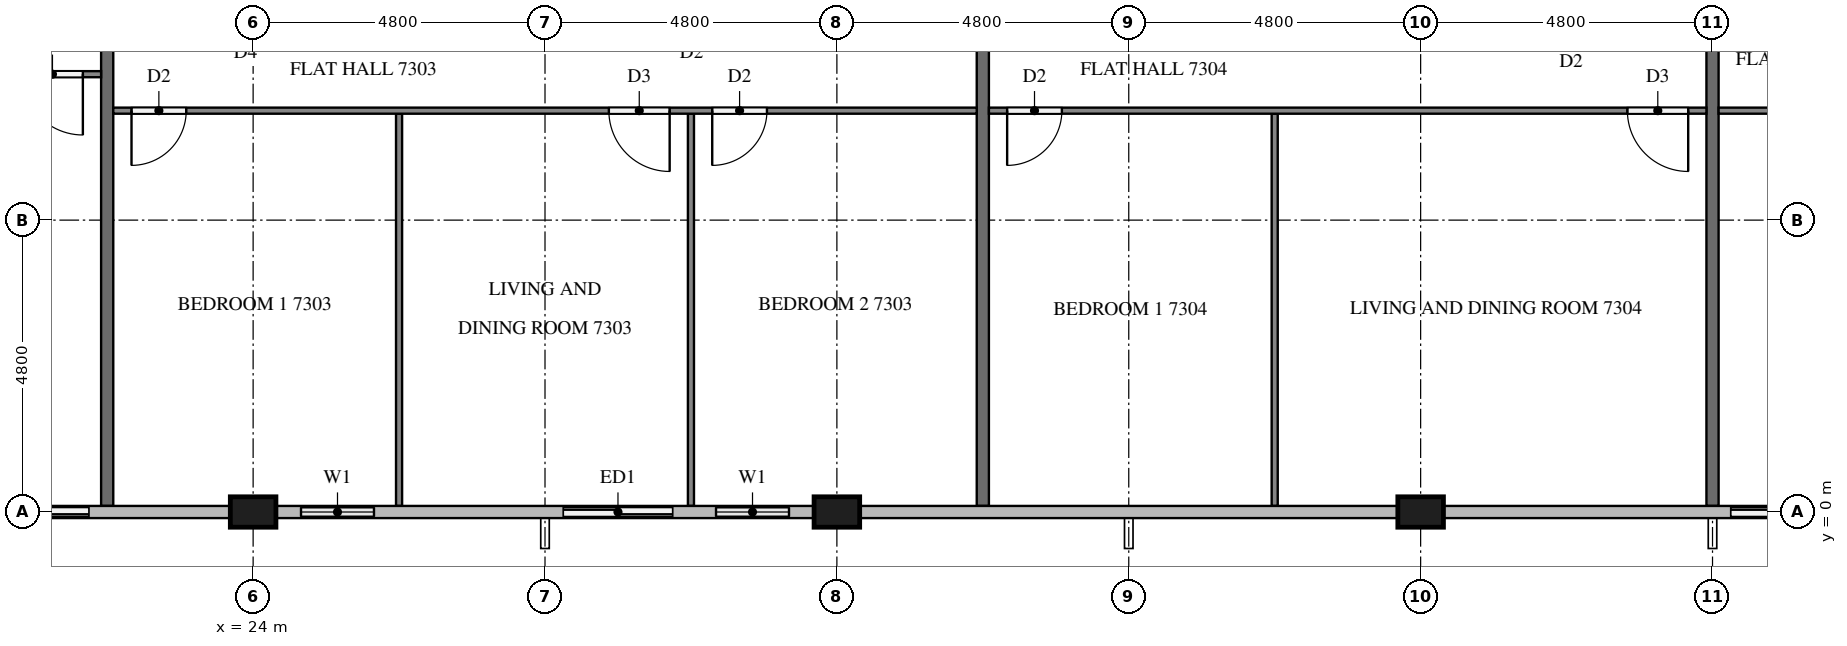
"""IFC4 building model, lengths in metres.
Left out: names, types, materials, properties, quantities, classifications, styles, units other than length and angle.
Written with IfcOpenShell. Run it as: python <this file> out.ifc"""

import sys

from ifc_helpers import new_model, si_unit, direction, frame, frame_2d, origin, origin_2d, place, context, subcontext, project, spatial, rectangle, extrude, element, fill, save


model = new_model("IFC4")
c1 = context("Model", 3, precision=1e-05, world=origin(), true_north=direction((0.0, 1.0)))
c2 = subcontext(c1, "Body", "Model", "MODEL_VIEW")
j1 = project(units=[si_unit("LENGTHUNIT", "METRE"), si_unit("PLANEANGLEUNIT", "RADIAN")], contexts=[c1])
p1 = place(None, origin())
s1 = spatial("IfcSite", under=j1, at=p1, CompositionType="ELEMENT")
p2 = place(p1, origin())
s2 = spatial("IfcBuilding", under=s1, at=p2, CompositionType="ELEMENT")
p3 = place(p2, frame((0.0, 0.0, 279.1)))
s3 = spatial("IfcBuildingStorey", under=s2, at=p3, CompositionType="ELEMENT", Elevation=279.1)
for number, where, z_axis, x_axis in (
    (1, (24.0, 0.0, 0.0), (0.0, 0.0, 1.0), (1.0, 0.0, 0.0)),
    (2, (33.6, 0.0, 0.0), (0.0, 0.0, 1.0), (1.0, 0.0, 0.0)),
    (3, (43.2, 0.0, 0.0), (0.0, 0.0, 1.0), (1.0, 0.0, 0.0)),
):
    element("IfcColumn", number, at=place(p3, frame(where, z_axis=z_axis, x_axis=x_axis)), inside=s3, PredefinedType="COLUMN", context=c2, shape_type="SweptSolid", body=[
        extrude(rectangle(XDim=0.75, YDim=0.5, at=origin_2d()), origin(), (0.0, 0.0, 1.0), 3.2),
    ])
p4 = place(p3, frame((19.2, 0.0, 0.0), z_axis=(0.0, 0.0, 1.0), x_axis=(1.0, 0.0, 0.0)))
e4 = element("IfcWall", 4, at=p4, inside=s3, PredefinedType="SOLIDWALL", context=c2, shape_type="SweptSolid", body=[
    extrude(rectangle(XDim=2.4, YDim=0.15, at=frame_2d((1.2, 0.0))), origin(), (0.0, 0.0, 1.0), 3.2),
])
p5 = place(p4, frame((0.3, 0.0, 0.0)))
e5 = element("IfcOpeningElement", 5, at=p5, cuts=e4, PredefinedType="OPENING", context=c2, shape_type="SweptSolid", body=[
    extrude(rectangle(XDim=1.8, YDim=2.4, at=frame_2d((0.9, 1.2))), frame((0.0, 0.085, 0.0), z_axis=(0.0, -1.0, 0.0), x_axis=(1.0, 0.0, 0.0)), (0.0, 0.0, 1.0), 0.17),
])
p6 = place(p3, frame((24.375, 0.0, 0.0), z_axis=(0.0, 0.0, 1.0), x_axis=(1.0, 0.0, 0.0)))
e6 = element("IfcWall", 6, at=p6, inside=s3, PredefinedType="SOLIDWALL", context=c2, shape_type="SweptSolid", body=[
    extrude(rectangle(XDim=2.025, YDim=0.15, at=frame_2d((1.012, 0.0))), origin(), (0.0, 0.0, 1.0), 3.2),
])
p7 = place(p6, frame((0.413, 0.0, 0.9)))
e7 = element("IfcOpeningElement", 7, at=p7, cuts=e6, PredefinedType="OPENING", context=c2, shape_type="SweptSolid", body=[
    extrude(rectangle(XDim=1.2, YDim=1.4, at=frame_2d((0.6, 0.7))), frame((0.0, 0.085, 0.0), z_axis=(0.0, -1.0, 0.0), x_axis=(1.0, 0.0, 0.0)), (0.0, 0.0, 1.0), 0.17),
])
p8 = place(p3, frame((28.8, 0.0, 0.0), z_axis=(0.0, 0.0, 1.0), x_axis=(1.0, 0.0, 0.0)))
e8 = element("IfcWall", 8, at=p8, inside=s3, PredefinedType="SOLIDWALL", context=c2, shape_type="SweptSolid", body=[
    extrude(rectangle(XDim=4.425, YDim=0.15, at=frame_2d((2.212, 0.0))), origin(), (0.0, 0.0, 1.0), 3.2),
])
p9 = place(p8, frame((0.3, 0.0, 0.0)))
e9 = element("IfcOpeningElement", 9, at=p9, cuts=e8, PredefinedType="OPENING", context=c2, shape_type="SweptSolid", body=[
    extrude(rectangle(XDim=1.8, YDim=2.4, at=frame_2d((0.9, 1.2))), frame((0.0, 0.085, 0.0), z_axis=(0.0, -1.0, 0.0), x_axis=(1.0, 0.0, 0.0)), (0.0, 0.0, 1.0), 0.17),
])
p10 = place(p8, frame((2.812, 0.0, 0.9)))
e10 = element("IfcOpeningElement", 10, at=p10, cuts=e8, PredefinedType="OPENING", context=c2, shape_type="SweptSolid", body=[
    extrude(rectangle(XDim=1.2, YDim=1.4, at=frame_2d((0.6, 0.7))), frame((0.0, 0.085, 0.0), z_axis=(0.0, -1.0, 0.0), x_axis=(1.0, 0.0, 0.0)), (0.0, 0.0, 1.0), 0.17),
])
p11 = place(p3, frame((48.0, 0.0, 0.0), z_axis=(0.0, 0.0, 1.0), x_axis=(1.0, 0.0, 0.0)))
e11 = element("IfcWall", 11, at=p11, inside=s3, PredefinedType="SOLIDWALL", context=c2, shape_type="SweptSolid", body=[
    extrude(rectangle(XDim=2.4, YDim=0.15, at=frame_2d((1.2, 0.0))), origin(), (0.0, 0.0, 1.0), 3.2),
])
p12 = place(p11, frame((0.3, 0.0, 0.0)))
e12 = element("IfcOpeningElement", 12, at=p12, cuts=e11, PredefinedType="OPENING", context=c2, shape_type="SweptSolid", body=[
    extrude(rectangle(XDim=1.8, YDim=2.4, at=frame_2d((0.9, 1.2))), frame((0.0, 0.085, 0.0), z_axis=(0.0, -1.0, 0.0), x_axis=(1.0, 0.0, 0.0)), (0.0, 0.0, 1.0), 0.17),
])
for number, where, z_axis, x_axis in (
    (13, (21.6, 11.9, 0.0), (0.0, 0.0, 1.0), (0.0, -1.0, 0.0)),
    (14, (36.0, 11.9, 0.0), (0.0, 0.0, 1.0), (0.0, -1.0, 0.0)),
    (15, (48.0, 11.9, 0.0), (0.0, 0.0, 1.0), (0.0, -1.0, 0.0)),
):
    element("IfcWall", number, at=place(p3, frame(where, z_axis=z_axis, x_axis=x_axis)), inside=s3, PredefinedType="PARTITIONING", context=c2, shape_type="SweptSolid", body=[
        extrude(rectangle(XDim=11.8, YDim=0.2, at=frame_2d((5.9, 0.0))), origin(), (0.0, 0.0, 1.0), 3.2),
    ])
p13 = place(p3, frame((21.5, 7.2, 0.0), z_axis=(0.0, 0.0, 1.0), x_axis=(-1.0, 0.0, 0.0)))
e16 = element("IfcWall", 16, at=p13, inside=s3, PredefinedType="PARTITIONING", context=c2, shape_type="SweptSolid", body=[
    extrude(rectangle(XDim=7.0, YDim=0.1, at=frame_2d((3.5, 0.0))), origin(), (0.0, 0.0, 1.0), 3.2),
])
p14 = place(p13, frame((0.3, 0.0, 0.0)))
e17 = element("IfcOpeningElement", 17, at=p14, cuts=e16, PredefinedType="OPENING", context=c2, shape_type="SweptSolid", body=[
    extrude(rectangle(XDim=1.0, YDim=2.1, at=frame_2d((0.5, 1.05))), frame((0.0, 0.06, 0.0), z_axis=(0.0, -1.0, 0.0), x_axis=(1.0, 0.0, 0.0)), (0.0, 0.0, 1.0), 0.12),
])
for number, where, z_axis, x_axis in (
    (18, (26.4, 6.55, 0.0), (0.0, 0.0, 1.0), (0.0, -1.0, 0.0)),
    (19, (31.2, 6.55, 0.0), (0.0, 0.0, 1.0), (0.0, -1.0, 0.0)),
):
    element("IfcWall", number, at=place(p3, frame(where, z_axis=z_axis, x_axis=x_axis)), inside=s3, PredefinedType="PARTITIONING", context=c2, shape_type="SweptSolid", body=[
        extrude(rectangle(XDim=6.45, YDim=0.1, at=frame_2d((3.225, 0.0))), origin(), (0.0, 0.0, 1.0), 3.2),
    ])
p15 = place(p3, frame((35.9, 6.6, 0.0), z_axis=(0.0, 0.0, 1.0), x_axis=(-1.0, 0.0, 0.0)))
e20 = element("IfcWall", 20, at=p15, inside=s3, PredefinedType="PARTITIONING", context=c2, shape_type="SweptSolid", body=[
    extrude(rectangle(XDim=14.2, YDim=0.1, at=frame_2d((7.1, 0.0))), origin(), (0.0, 0.0, 1.0), 3.2),
])
p16 = place(p15, frame((13.0, 0.0, 0.0)))
e21 = element("IfcOpeningElement", 21, at=p16, cuts=e20, PredefinedType="OPENING", context=c2, shape_type="SweptSolid", body=[
    extrude(rectangle(XDim=0.9, YDim=2.1, at=frame_2d((0.45, 1.05))), frame((0.0, 0.06, 0.0), z_axis=(0.0, -1.0, 0.0), x_axis=(1.0, 0.0, 0.0)), (0.0, 0.0, 1.0), 0.12),
])
p17 = place(p15, frame((5.05, 0.0, 0.0)))
e22 = element("IfcOpeningElement", 22, at=p17, cuts=e20, PredefinedType="OPENING", context=c2, shape_type="SweptSolid", body=[
    extrude(rectangle(XDim=1.0, YDim=2.1, at=frame_2d((0.5, 1.05))), frame((0.0, 0.06, 0.0), z_axis=(0.0, -1.0, 0.0), x_axis=(1.0, 0.0, 0.0)), (0.0, 0.0, 1.0), 0.12),
])
p18 = place(p15, frame((3.45, 0.0, 0.0)))
e23 = element("IfcOpeningElement", 23, at=p18, cuts=e20, PredefinedType="OPENING", context=c2, shape_type="SweptSolid", body=[
    extrude(rectangle(XDim=0.9, YDim=2.1, at=frame_2d((0.45, 1.05))), frame((0.0, 0.06, 0.0), z_axis=(0.0, -1.0, 0.0), x_axis=(1.0, 0.0, 0.0)), (0.0, 0.0, 1.0), 0.12),
])
p19 = place(p3, frame((40.8, 6.55, 0.0), z_axis=(0.0, 0.0, 1.0), x_axis=(0.0, -1.0, 0.0)))
e24 = element("IfcWall", 24, at=p19, inside=s3, PredefinedType="PARTITIONING", context=c2, shape_type="SweptSolid", body=[
    extrude(rectangle(XDim=6.45, YDim=0.1, at=frame_2d((3.225, 0.0))), origin(), (0.0, 0.0, 1.0), 3.2),
])
p20 = place(p3, frame((47.9, 6.6, 0.0), z_axis=(0.0, 0.0, 1.0), x_axis=(-1.0, 0.0, 0.0)))
e25 = element("IfcWall", 25, at=p20, inside=s3, PredefinedType="PARTITIONING", context=c2, shape_type="SweptSolid", body=[
    extrude(rectangle(XDim=11.8, YDim=0.1, at=frame_2d((5.9, 0.0))), origin(), (0.0, 0.0, 1.0), 3.2),
])
p21 = place(p20, frame((0.3, 0.0, 0.0)))
e26 = element("IfcOpeningElement", 26, at=p21, cuts=e25, PredefinedType="OPENING", context=c2, shape_type="SweptSolid", body=[
    extrude(rectangle(XDim=1.0, YDim=2.1, at=frame_2d((0.5, 1.05))), frame((0.0, 0.06, 0.0), z_axis=(0.0, -1.0, 0.0), x_axis=(1.0, 0.0, 0.0)), (0.0, 0.0, 1.0), 0.12),
])
p22 = place(p20, frame((10.6, 0.0, 0.0)))
e27 = element("IfcOpeningElement", 27, at=p22, cuts=e25, PredefinedType="OPENING", context=c2, shape_type="SweptSolid", body=[
    extrude(rectangle(XDim=0.9, YDim=2.1, at=frame_2d((0.45, 1.05))), frame((0.0, 0.06, 0.0), z_axis=(0.0, -1.0, 0.0), x_axis=(1.0, 0.0, 0.0)), (0.0, 0.0, 1.0), 0.12),
])
p23 = place(p3, frame((57.5, 6.6, 0.0), z_axis=(0.0, 0.0, 1.0), x_axis=(-1.0, 0.0, 0.0)))
e28 = element("IfcWall", 28, at=p23, inside=s3, PredefinedType="PARTITIONING", context=c2, shape_type="SweptSolid", body=[
    extrude(rectangle(XDim=9.4, YDim=0.1, at=frame_2d((4.7, 0.0))), origin(), (0.0, 0.0, 1.0), 3.2),
])
p24 = place(p23, frame((5.05, 0.0, 0.0)))
e29 = element("IfcOpeningElement", 29, at=p24, cuts=e28, PredefinedType="OPENING", context=c2, shape_type="SweptSolid", body=[
    extrude(rectangle(XDim=1.0, YDim=2.1, at=frame_2d((0.5, 1.05))), frame((0.0, 0.06, 0.0), z_axis=(0.0, -1.0, 0.0), x_axis=(1.0, 0.0, 0.0)), (0.0, 0.0, 1.0), 0.12),
])
p25 = place(p23, frame((3.45, 0.0, 0.0)))
e30 = element("IfcOpeningElement", 30, at=p25, cuts=e28, PredefinedType="OPENING", context=c2, shape_type="SweptSolid", body=[
    extrude(rectangle(XDim=0.9, YDim=2.1, at=frame_2d((0.45, 1.05))), frame((0.0, 0.06, 0.0), z_axis=(0.0, -1.0, 0.0), x_axis=(1.0, 0.0, 0.0)), (0.0, 0.0, 1.0), 0.12),
])
p26 = place(p5, origin())
e31 = element("IfcDoor", 31, at=p26, inside=s3, OperationType="SLIDING_TO_LEFT", PredefinedType="DOOR", context=c2, shape_type="SweptSolid", body=[
    extrude(rectangle(XDim=1.8, YDim=2.4, at=frame_2d((0.9, 1.2))), frame((0.0, 0.025, 0.0), z_axis=(0.0, -1.0, 0.0), x_axis=(1.0, 0.0, 0.0)), (0.0, 0.0, 1.0), 0.05),
])
fill(e5, e31)
p27 = place(p7, origin())
e32 = element("IfcWindow", 32, at=p27, inside=s3, PartitioningType="SINGLE_PANEL", PredefinedType="WINDOW", context=c2, shape_type="SweptSolid", body=[
    extrude(rectangle(XDim=1.2, YDim=1.4, at=frame_2d((0.6, 0.7))), frame((0.0, 0.03, 0.0), z_axis=(0.0, -1.0, 0.0), x_axis=(1.0, 0.0, 0.0)), (0.0, 0.0, 1.0), 0.06),
])
fill(e7, e32)
p28 = place(p9, origin())
e33 = element("IfcDoor", 33, at=p28, inside=s3, OperationType="SLIDING_TO_RIGHT", PredefinedType="DOOR", context=c2, shape_type="SweptSolid", body=[
    extrude(rectangle(XDim=1.8, YDim=2.4, at=frame_2d((0.9, 1.2))), frame((0.0, 0.025, 0.0), z_axis=(0.0, -1.0, 0.0), x_axis=(1.0, 0.0, 0.0)), (0.0, 0.0, 1.0), 0.05),
])
fill(e9, e33)
p29 = place(p10, origin())
e34 = element("IfcWindow", 34, at=p29, inside=s3, PartitioningType="SINGLE_PANEL", PredefinedType="WINDOW", context=c2, shape_type="SweptSolid", body=[
    extrude(rectangle(XDim=1.2, YDim=1.4, at=frame_2d((0.6, 0.7))), frame((0.0, 0.03, 0.0), z_axis=(0.0, -1.0, 0.0), x_axis=(1.0, 0.0, 0.0)), (0.0, 0.0, 1.0), 0.06),
])
fill(e10, e34)
p30 = place(p12, origin())
e35 = element("IfcDoor", 35, at=p30, inside=s3, OperationType="SLIDING_TO_LEFT", PredefinedType="DOOR", context=c2, shape_type="SweptSolid", body=[
    extrude(rectangle(XDim=1.8, YDim=2.4, at=frame_2d((0.9, 1.2))), frame((0.0, 0.025, 0.0), z_axis=(0.0, -1.0, 0.0), x_axis=(1.0, 0.0, 0.0)), (0.0, 0.0, 1.0), 0.05),
])
fill(e12, e35)
p31 = place(p14, origin())
e36 = element("IfcDoor", 36, at=p31, inside=s3, OperationType="SINGLE_SWING_LEFT", PredefinedType="DOOR", context=c2, shape_type="SweptSolid", body=[
    extrude(rectangle(XDim=1.0, YDim=2.1, at=frame_2d((0.5, 1.05))), frame((0.0, 0.025, 0.0), z_axis=(0.0, -1.0, 0.0), x_axis=(1.0, 0.0, 0.0)), (0.0, 0.0, 1.0), 0.05),
])
fill(e17, e36)
p32 = place(p16, origin())
e37 = element("IfcDoor", 37, at=p32, inside=s3, OperationType="SINGLE_SWING_RIGHT", PredefinedType="DOOR", context=c2, shape_type="SweptSolid", body=[
    extrude(rectangle(XDim=0.9, YDim=2.1, at=frame_2d((0.45, 1.05))), frame((0.0, 0.025, 0.0), z_axis=(0.0, -1.0, 0.0), x_axis=(1.0, 0.0, 0.0)), (0.0, 0.0, 1.0), 0.05),
])
fill(e21, e37)
p33 = place(p17, origin())
e38 = element("IfcDoor", 38, at=p33, inside=s3, OperationType="SINGLE_SWING_LEFT", PredefinedType="DOOR", context=c2, shape_type="SweptSolid", body=[
    extrude(rectangle(XDim=1.0, YDim=2.1, at=frame_2d((0.5, 1.05))), frame((0.0, 0.025, 0.0), z_axis=(0.0, -1.0, 0.0), x_axis=(1.0, 0.0, 0.0)), (0.0, 0.0, 1.0), 0.05),
])
fill(e22, e38)
p34 = place(p18, origin())
e39 = element("IfcDoor", 39, at=p34, inside=s3, OperationType="SINGLE_SWING_RIGHT", PredefinedType="DOOR", context=c2, shape_type="SweptSolid", body=[
    extrude(rectangle(XDim=0.9, YDim=2.1, at=frame_2d((0.45, 1.05))), frame((0.0, 0.025, 0.0), z_axis=(0.0, -1.0, 0.0), x_axis=(1.0, 0.0, 0.0)), (0.0, 0.0, 1.0), 0.05),
])
fill(e23, e39)
p35 = place(p21, origin())
e40 = element("IfcDoor", 40, at=p35, inside=s3, OperationType="SINGLE_SWING_LEFT", PredefinedType="DOOR", context=c2, shape_type="SweptSolid", body=[
    extrude(rectangle(XDim=1.0, YDim=2.1, at=frame_2d((0.5, 1.05))), frame((0.0, 0.025, 0.0), z_axis=(0.0, -1.0, 0.0), x_axis=(1.0, 0.0, 0.0)), (0.0, 0.0, 1.0), 0.05),
])
fill(e26, e40)
p36 = place(p22, origin())
e41 = element("IfcDoor", 41, at=p36, inside=s3, OperationType="SINGLE_SWING_RIGHT", PredefinedType="DOOR", context=c2, shape_type="SweptSolid", body=[
    extrude(rectangle(XDim=0.9, YDim=2.1, at=frame_2d((0.45, 1.05))), frame((0.0, 0.025, 0.0), z_axis=(0.0, -1.0, 0.0), x_axis=(1.0, 0.0, 0.0)), (0.0, 0.0, 1.0), 0.05),
])
fill(e27, e41)
save(model, sys.argv[1])
